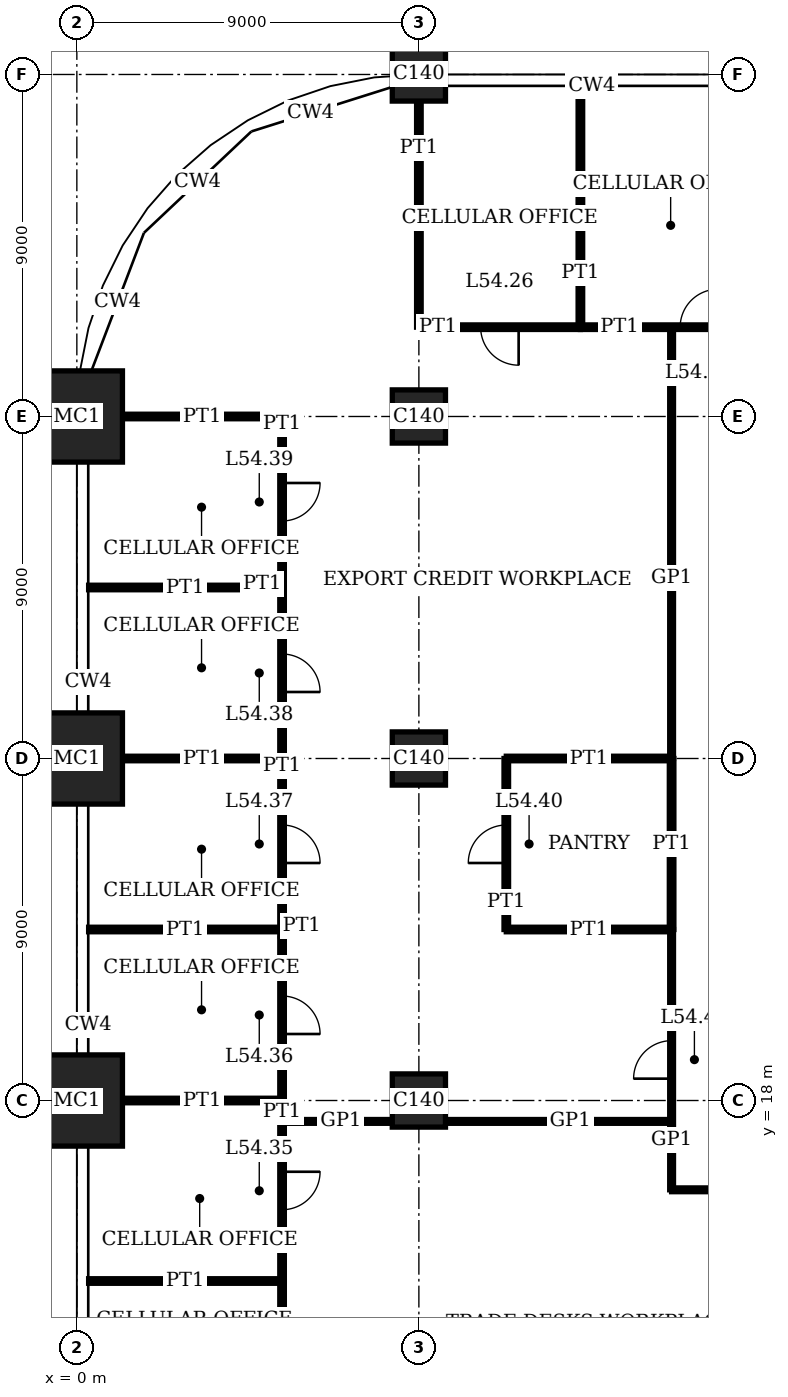
"""IFC4 building model, lengths in metres.
Left out: names, types, materials, properties, quantities, classifications, styles, units other than length and angle.
Written with IfcOpenShell. Run it as: python <this file> out.ifc"""

import sys

from ifc_helpers import new_model, si_unit, direction, frame, frame_2d, origin, origin_2d, place, context, subcontext, project, spatial, rectangle, extrude, element, fill, save


model = new_model("IFC4")
c1 = context("Model", 3, precision=1e-05, world=origin(), true_north=direction((0.0, 1.0)))
c2 = subcontext(c1, "Body", "Model", "MODEL_VIEW")
j1 = project(units=[si_unit("LENGTHUNIT", "METRE"), si_unit("PLANEANGLEUNIT", "RADIAN")], contexts=[c1])
p1 = place(None, origin())
s1 = spatial("IfcSite", under=j1, at=p1, CompositionType="ELEMENT")
p2 = place(p1, origin())
s2 = spatial("IfcBuilding", under=s1, at=p2, CompositionType="ELEMENT")
p3 = place(p2, frame((0.0, 0.0, 222.2)))
s3 = spatial("IfcBuildingStorey", under=s2, at=p3, CompositionType="ELEMENT", Elevation=222.2)
for number, where, z_axis, x_axis in (
    (1, (0.0, 18.0, 0.0), (0.0, 0.0, 1.0), (1.0, 0.0, 0.0)),
    (2, (0.0, 27.0, 0.0), (0.0, 0.0, 1.0), (1.0, 0.0, 0.0)),
    (3, (0.0, 36.0, 0.0), (0.0, 0.0, 1.0), (1.0, 0.0, 0.0)),
):
    element("IfcColumn", number, at=place(p3, frame(where, z_axis=z_axis, x_axis=x_axis)), inside=s3, PredefinedType="COLUMN", context=c2, shape_type="SweptSolid", body=[
        extrude(rectangle(XDim=2.4, YDim=2.4, at=origin_2d()), origin(), (0.0, 0.0, 1.0), 4.0),
    ])
for number, where, z_axis, x_axis in (
    (4, (9.0, 18.0, 0.0), (0.0, 0.0, 1.0), (1.0, 0.0, 0.0)),
    (5, (9.0, 27.0, 0.0), (0.0, 0.0, 1.0), (1.0, 0.0, 0.0)),
    (6, (9.0, 36.0, 0.0), (0.0, 0.0, 1.0), (1.0, 0.0, 0.0)),
    (7, (9.0, 45.0, 0.0), (0.0, 0.0, 1.0), (1.0, 0.0, 0.0)),
):
    element("IfcColumn", number, at=place(p3, frame(where, z_axis=z_axis, x_axis=x_axis)), inside=s3, PredefinedType="COLUMN", context=c2, shape_type="SweptSolid", body=[
        extrude(rectangle(XDim=1.4, YDim=1.4, at=origin_2d()), origin(), (0.0, 0.0, 1.0), 4.0),
    ])
p4 = place(p3, frame((0.31, 13.25, 0.0), z_axis=(0.0, 0.0, 1.0), x_axis=(1.0, 0.0, 0.0)))
e8 = element("IfcWall", 8, at=p4, inside=s3, PredefinedType="PARTITIONING", context=c2, shape_type="SweptSolid", body=[
    extrude(rectangle(XDim=5.09, YDim=0.12, at=frame_2d((2.545, 0.0))), origin(), (0.0, 0.0, 1.0), 3.1),
])
p5 = place(p3, frame((15.65, 15.65, 0.0), z_axis=(0.0, 0.0, 1.0), x_axis=(1.0, 0.0, 0.0)))
e9 = element("IfcWall", 9, at=p5, inside=s3, PredefinedType="PARTITIONING", context=c2, shape_type="SweptSolid", body=[
    extrude(rectangle(XDim=15.85, YDim=0.1, at=frame_2d((7.925, 0.0))), origin(), (0.0, 0.0, 1.0), 3.75),
])
p6 = place(p5, frame((7.425, 0.0, 0.0)))
e10 = element("IfcOpeningElement", 10, at=p6, cuts=e9, PredefinedType="OPENING", context=c2, shape_type="SweptSolid", body=[
    extrude(rectangle(XDim=1.0, YDim=2.4, at=frame_2d((0.5, 1.2))), frame((0.0, 0.06, 0.0), z_axis=(0.0, -1.0, 0.0), x_axis=(1.0, 0.0, 0.0)), (0.0, 0.0, 1.0), 0.12),
])
p7 = place(p3, frame((5.39, 17.45, 0.0), z_axis=(0.0, 0.0, 1.0), x_axis=(1.0, 0.0, 0.0)))
e11 = element("IfcWall", 11, at=p7, inside=s3, PredefinedType="PARTITIONING", context=c2, shape_type="SweptSolid", body=[
    extrude(rectangle(XDim=2.91, YDim=0.1, at=frame_2d((1.455, 0.0))), origin(), (0.0, 0.0, 1.0), 3.05),
])
p8 = place(p3, frame((9.7, 17.45, 0.0), z_axis=(0.0, 0.0, 1.0), x_axis=(1.0, 0.0, 0.0)))
e12 = element("IfcWall", 12, at=p8, inside=s3, PredefinedType="PARTITIONING", context=c2, shape_type="SweptSolid", body=[
    extrude(rectangle(XDim=5.95, YDim=0.1, at=frame_2d((2.975, 0.0))), origin(), (0.0, 0.0, 1.0), 3.05),
])
p9 = place(p3, frame((1.2, 18.0, 0.0), z_axis=(0.0, 0.0, 1.0), x_axis=(1.0, 0.0, 0.0)))
e13 = element("IfcWall", 13, at=p9, inside=s3, PredefinedType="PARTITIONING", context=c2, shape_type="SweptSolid", body=[
    extrude(rectangle(XDim=4.2, YDim=0.12, at=frame_2d((2.1, 0.0))), origin(), (0.0, 0.0, 1.0), 3.05),
])
p10 = place(p3, frame((0.31, 22.5, 0.0), z_axis=(0.0, 0.0, 1.0), x_axis=(1.0, 0.0, 0.0)))
e14 = element("IfcWall", 14, at=p10, inside=s3, PredefinedType="PARTITIONING", context=c2, shape_type="SweptSolid", body=[
    extrude(rectangle(XDim=5.09, YDim=0.12, at=frame_2d((2.545, 0.0))), origin(), (0.0, 0.0, 1.0), 3.1),
])
p11 = place(p3, frame((11.3, 22.5, 0.0), z_axis=(0.0, 0.0, 1.0), x_axis=(1.0, 0.0, 0.0)))
e15 = element("IfcWall", 15, at=p11, inside=s3, PredefinedType="PARTITIONING", context=c2, shape_type="SweptSolid", body=[
    extrude(rectangle(XDim=4.35, YDim=0.12, at=frame_2d((2.175, 0.0))), origin(), (0.0, 0.0, 1.0), 3.1),
])
p12 = place(p3, frame((1.2, 27.0, 0.0), z_axis=(0.0, 0.0, 1.0), x_axis=(1.0, 0.0, 0.0)))
e16 = element("IfcWall", 16, at=p12, inside=s3, PredefinedType="PARTITIONING", context=c2, shape_type="SweptSolid", body=[
    extrude(rectangle(XDim=4.2, YDim=0.12, at=frame_2d((2.1, 0.0))), origin(), (0.0, 0.0, 1.0), 3.05),
])
p13 = place(p3, frame((11.3, 27.0, 0.0), z_axis=(0.0, 0.0, 1.0), x_axis=(1.0, 0.0, 0.0)))
e17 = element("IfcWall", 17, at=p13, inside=s3, PredefinedType="PARTITIONING", context=c2, shape_type="SweptSolid", body=[
    extrude(rectangle(XDim=4.35, YDim=0.12, at=frame_2d((2.175, 0.0))), origin(), (0.0, 0.0, 1.0), 3.05),
])
p14 = place(p3, frame((0.31, 31.5, 0.0), z_axis=(0.0, 0.0, 1.0), x_axis=(1.0, 0.0, 0.0)))
e18 = element("IfcWall", 18, at=p14, inside=s3, PredefinedType="PARTITIONING", context=c2, shape_type="SweptSolid", body=[
    extrude(rectangle(XDim=5.09, YDim=0.12, at=frame_2d((2.545, 0.0))), origin(), (0.0, 0.0, 1.0), 3.1),
])
p15 = place(p3, frame((1.2, 36.0, 0.0), z_axis=(0.0, 0.0, 1.0), x_axis=(1.0, 0.0, 0.0)))
e19 = element("IfcWall", 19, at=p15, inside=s3, PredefinedType="PARTITIONING", context=c2, shape_type="SweptSolid", body=[
    extrude(rectangle(XDim=4.2, YDim=0.12, at=frame_2d((2.1, 0.0))), origin(), (0.0, 0.0, 1.0), 3.05),
])
p16 = place(p3, frame((9.0, 38.35, 0.0), z_axis=(0.0, 0.0, 1.0), x_axis=(1.0, 0.0, 0.0)))
e20 = element("IfcWall", 20, at=p16, inside=s3, PredefinedType="PARTITIONING", context=c2, shape_type="SweptSolid", body=[
    extrude(rectangle(XDim=4.25, YDim=0.12, at=frame_2d((2.125, 0.0))), origin(), (0.0, 0.0, 1.0), 3.75),
])
p17 = place(p16, frame((1.625, 0.0, 0.0)))
e21 = element("IfcOpeningElement", 21, at=p17, cuts=e20, PredefinedType="OPENING", context=c2, shape_type="SweptSolid", body=[
    extrude(rectangle(XDim=1.0, YDim=2.4, at=frame_2d((0.5, 1.2))), frame((0.0, 0.07, 0.0), z_axis=(0.0, -1.0, 0.0), x_axis=(1.0, 0.0, 0.0)), (0.0, 0.0, 1.0), 0.14),
])
p18 = place(p3, frame((13.25, 38.35, 0.0), z_axis=(0.0, 0.0, 1.0), x_axis=(1.0, 0.0, 0.0)))
e22 = element("IfcWall", 22, at=p18, inside=s3, PredefinedType="PARTITIONING", context=c2, shape_type="SweptSolid", body=[
    extrude(rectangle(XDim=4.75, YDim=0.12, at=frame_2d((2.375, 0.0))), origin(), (0.0, 0.0, 1.0), 3.75),
])
p19 = place(p18, frame((2.625, 0.0, 0.0)))
e23 = element("IfcOpeningElement", 23, at=p19, cuts=e22, PredefinedType="OPENING", context=c2, shape_type="SweptSolid", body=[
    extrude(rectangle(XDim=1.0, YDim=2.4, at=frame_2d((0.5, 1.2))), frame((0.0, 0.07, 0.0), z_axis=(0.0, -1.0, 0.0), x_axis=(1.0, 0.0, 0.0)), (0.0, 0.0, 1.0), 0.14),
])
p20 = place(p3, frame((5.4, 9.0, 0.0), z_axis=(0.0, 0.0, 1.0), x_axis=(0.0, 1.0, 0.0)))
e24 = element("IfcWall", 24, at=p20, inside=s3, PredefinedType="PARTITIONING", context=c2, shape_type="SweptSolid", body=[
    extrude(rectangle(XDim=4.25, YDim=0.12, at=frame_2d((2.125, 0.0))), origin(), (0.0, 0.0, 1.0), 3.75),
])
p21 = place(p20, frame((1.625, 0.0, 0.0)))
e25 = element("IfcOpeningElement", 25, at=p21, cuts=e24, PredefinedType="OPENING", context=c2, shape_type="SweptSolid", body=[
    extrude(rectangle(XDim=1.0, YDim=2.4, at=frame_2d((0.5, 1.2))), frame((0.0, 0.07, 0.0), z_axis=(0.0, -1.0, 0.0), x_axis=(1.0, 0.0, 0.0)), (0.0, 0.0, 1.0), 0.14),
])
p22 = place(p3, frame((5.4, 13.25, 0.0), z_axis=(0.0, 0.0, 1.0), x_axis=(0.0, 1.0, 0.0)))
e26 = element("IfcWall", 26, at=p22, inside=s3, PredefinedType="PARTITIONING", context=c2, shape_type="SweptSolid", body=[
    extrude(rectangle(XDim=4.75, YDim=0.12, at=frame_2d((2.375, 0.0))), origin(), (0.0, 0.0, 1.0), 3.75),
])
p23 = place(p22, frame((1.875, 0.0, 0.0)))
e27 = element("IfcOpeningElement", 27, at=p23, cuts=e26, PredefinedType="OPENING", context=c2, shape_type="SweptSolid", body=[
    extrude(rectangle(XDim=1.0, YDim=2.4, at=frame_2d((0.5, 1.2))), frame((0.0, 0.07, 0.0), z_axis=(0.0, -1.0, 0.0), x_axis=(1.0, 0.0, 0.0)), (0.0, 0.0, 1.0), 0.14),
])
p24 = place(p3, frame((5.4, 18.0, 0.0), z_axis=(0.0, 0.0, 1.0), x_axis=(0.0, 1.0, 0.0)))
e28 = element("IfcWall", 28, at=p24, inside=s3, PredefinedType="PARTITIONING", context=c2, shape_type="SweptSolid", body=[
    extrude(rectangle(XDim=4.5, YDim=0.12, at=frame_2d((2.25, 0.0))), origin(), (0.0, 0.0, 1.0), 3.75),
])
p25 = place(p24, frame((1.75, 0.0, 0.0)))
e29 = element("IfcOpeningElement", 29, at=p25, cuts=e28, PredefinedType="OPENING", context=c2, shape_type="SweptSolid", body=[
    extrude(rectangle(XDim=1.0, YDim=2.4, at=frame_2d((0.5, 1.2))), frame((0.0, 0.07, 0.0), z_axis=(0.0, -1.0, 0.0), x_axis=(1.0, 0.0, 0.0)), (0.0, 0.0, 1.0), 0.14),
])
p26 = place(p3, frame((5.4, 22.5, 0.0), z_axis=(0.0, 0.0, 1.0), x_axis=(0.0, 1.0, 0.0)))
e30 = element("IfcWall", 30, at=p26, inside=s3, PredefinedType="PARTITIONING", context=c2, shape_type="SweptSolid", body=[
    extrude(rectangle(XDim=4.5, YDim=0.12, at=frame_2d((2.25, 0.0))), origin(), (0.0, 0.0, 1.0), 3.75),
])
p27 = place(p26, frame((1.75, 0.0, 0.0)))
e31 = element("IfcOpeningElement", 31, at=p27, cuts=e30, PredefinedType="OPENING", context=c2, shape_type="SweptSolid", body=[
    extrude(rectangle(XDim=1.0, YDim=2.4, at=frame_2d((0.5, 1.2))), frame((0.0, 0.07, 0.0), z_axis=(0.0, -1.0, 0.0), x_axis=(1.0, 0.0, 0.0)), (0.0, 0.0, 1.0), 0.14),
])
p28 = place(p3, frame((5.4, 27.0, 0.0), z_axis=(0.0, 0.0, 1.0), x_axis=(0.0, 1.0, 0.0)))
e32 = element("IfcWall", 32, at=p28, inside=s3, PredefinedType="PARTITIONING", context=c2, shape_type="SweptSolid", body=[
    extrude(rectangle(XDim=4.5, YDim=0.12, at=frame_2d((2.25, 0.0))), origin(), (0.0, 0.0, 1.0), 3.75),
])
p29 = place(p28, frame((1.75, 0.0, 0.0)))
e33 = element("IfcOpeningElement", 33, at=p29, cuts=e32, PredefinedType="OPENING", context=c2, shape_type="SweptSolid", body=[
    extrude(rectangle(XDim=1.0, YDim=2.4, at=frame_2d((0.5, 1.2))), frame((0.0, 0.07, 0.0), z_axis=(0.0, -1.0, 0.0), x_axis=(1.0, 0.0, 0.0)), (0.0, 0.0, 1.0), 0.14),
])
p30 = place(p3, frame((5.4, 31.5, 0.0), z_axis=(0.0, 0.0, 1.0), x_axis=(0.0, 1.0, 0.0)))
e34 = element("IfcWall", 34, at=p30, inside=s3, PredefinedType="PARTITIONING", context=c2, shape_type="SweptSolid", body=[
    extrude(rectangle(XDim=4.5, YDim=0.12, at=frame_2d((2.25, 0.0))), origin(), (0.0, 0.0, 1.0), 3.75),
])
p31 = place(p30, frame((1.75, 0.0, 0.0)))
e35 = element("IfcOpeningElement", 35, at=p31, cuts=e34, PredefinedType="OPENING", context=c2, shape_type="SweptSolid", body=[
    extrude(rectangle(XDim=1.0, YDim=2.4, at=frame_2d((0.5, 1.2))), frame((0.0, 0.07, 0.0), z_axis=(0.0, -1.0, 0.0), x_axis=(1.0, 0.0, 0.0)), (0.0, 0.0, 1.0), 0.14),
])
p32 = place(p3, frame((9.0, 38.35, 0.0), z_axis=(0.0, 0.0, 1.0), x_axis=(0.0, 1.0, 0.0)))
e36 = element("IfcWall", 36, at=p32, inside=s3, PredefinedType="PARTITIONING", context=c2, shape_type="SweptSolid", body=[
    extrude(rectangle(XDim=5.95, YDim=0.12, at=frame_2d((2.975, 0.0))), origin(), (0.0, 0.0, 1.0), 3.05),
])
p33 = place(p3, frame((11.3, 22.5, 0.0), z_axis=(0.0, 0.0, 1.0), x_axis=(0.0, 1.0, 0.0)))
e37 = element("IfcWall", 37, at=p33, inside=s3, PredefinedType="PARTITIONING", context=c2, shape_type="SweptSolid", body=[
    extrude(rectangle(XDim=4.5, YDim=0.12, at=frame_2d((2.25, 0.0))), origin(), (0.0, 0.0, 1.0), 3.75),
])
p34 = place(p33, frame((1.75, 0.0, 0.0)))
e38 = element("IfcOpeningElement", 38, at=p34, cuts=e37, PredefinedType="OPENING", context=c2, shape_type="SweptSolid", body=[
    extrude(rectangle(XDim=1.0, YDim=2.4, at=frame_2d((0.5, 1.2))), frame((0.0, 0.07, 0.0), z_axis=(0.0, -1.0, 0.0), x_axis=(1.0, 0.0, 0.0)), (0.0, 0.0, 1.0), 0.14),
])
p35 = place(p3, frame((13.25, 38.35, 0.0), z_axis=(0.0, 0.0, 1.0), x_axis=(0.0, 1.0, 0.0)))
e39 = element("IfcWall", 39, at=p35, inside=s3, PredefinedType="PARTITIONING", context=c2, shape_type="SweptSolid", body=[
    extrude(rectangle(XDim=6.34, YDim=0.12, at=frame_2d((3.17, 0.0))), origin(), (0.0, 0.0, 1.0), 3.75),
])
p36 = place(p3, frame((15.65, 22.5, 0.0), z_axis=(0.0, 0.0, 1.0), x_axis=(0.0, 1.0, 0.0)))
e40 = element("IfcWall", 40, at=p36, inside=s3, PredefinedType="PARTITIONING", context=c2, shape_type="SweptSolid", body=[
    extrude(rectangle(XDim=4.5, YDim=0.12, at=frame_2d((2.25, 0.0))), origin(), (0.0, 0.0, 1.0), 3.75),
])
p37 = place(p3, frame((15.65, 15.65, 0.0), z_axis=(0.0, 0.0, 1.0), x_axis=(0.0, 1.0, 0.0)))
e41 = element("IfcWall", 41, at=p37, inside=s3, PredefinedType="PARTITIONING", context=c2, shape_type="SweptSolid", body=[
    extrude(rectangle(XDim=6.85, YDim=0.1, at=frame_2d((3.425, 0.0))), origin(), (0.0, 0.0, 1.0), 3.75),
])
p38 = place(p37, frame((2.925, 0.0, 0.0)))
e42 = element("IfcOpeningElement", 42, at=p38, cuts=e41, PredefinedType="OPENING", context=c2, shape_type="SweptSolid", body=[
    extrude(rectangle(XDim=1.0, YDim=2.4, at=frame_2d((0.5, 1.2))), frame((0.0, 0.06, 0.0), z_axis=(0.0, -1.0, 0.0), x_axis=(1.0, 0.0, 0.0)), (0.0, 0.0, 1.0), 0.12),
])
p39 = place(p3, frame((15.65, 27.0, 0.0), z_axis=(0.0, 0.0, 1.0), x_axis=(0.0, 1.0, 0.0)))
e43 = element("IfcWall", 43, at=p39, inside=s3, PredefinedType="PARTITIONING", context=c2, shape_type="SweptSolid", body=[
    extrude(rectangle(XDim=11.35, YDim=0.1, at=frame_2d((5.675, 0.0))), origin(), (0.0, 0.0, 1.0), 3.75),
])
p40 = place(p17, origin())
e44 = element("IfcDoor", 44, at=p40, inside=s3, OperationType="SINGLE_SWING_RIGHT", PredefinedType="DOOR", context=c2, shape_type="SweptSolid", body=[
    extrude(rectangle(XDim=1.0, YDim=2.4, at=frame_2d((0.5, 1.2))), frame((0.0, 0.025, 0.0), z_axis=(0.0, -1.0, 0.0), x_axis=(1.0, 0.0, 0.0)), (0.0, 0.0, 1.0), 0.05),
])
fill(e21, e44)
p41 = place(p19, origin())
e45 = element("IfcDoor", 45, at=p41, inside=s3, OperationType="SINGLE_SWING_LEFT", PredefinedType="DOOR", context=c2, shape_type="SweptSolid", body=[
    extrude(rectangle(XDim=1.0, YDim=2.4, at=frame_2d((0.5, 1.2))), frame((0.0, 0.025, 0.0), z_axis=(0.0, -1.0, 0.0), x_axis=(1.0, 0.0, 0.0)), (0.0, 0.0, 1.0), 0.05),
])
fill(e23, e45)
p42 = place(p23, origin())
e46 = element("IfcDoor", 46, at=p42, inside=s3, OperationType="SINGLE_SWING_RIGHT", PredefinedType="DOOR", context=c2, shape_type="SweptSolid", body=[
    extrude(rectangle(XDim=1.0, YDim=2.4, at=frame_2d((0.5, 1.2))), frame((0.0, 0.025, 0.0), z_axis=(0.0, -1.0, 0.0), x_axis=(1.0, 0.0, 0.0)), (0.0, 0.0, 1.0), 0.05),
])
fill(e27, e46)
p43 = place(p25, origin())
e47 = element("IfcDoor", 47, at=p43, inside=s3, OperationType="SINGLE_SWING_LEFT", PredefinedType="DOOR", context=c2, shape_type="SweptSolid", body=[
    extrude(rectangle(XDim=1.0, YDim=2.4, at=frame_2d((0.5, 1.2))), frame((0.0, 0.025, 0.0), z_axis=(0.0, -1.0, 0.0), x_axis=(1.0, 0.0, 0.0)), (0.0, 0.0, 1.0), 0.05),
])
fill(e29, e47)
p44 = place(p27, origin())
e48 = element("IfcDoor", 48, at=p44, inside=s3, OperationType="SINGLE_SWING_LEFT", PredefinedType="DOOR", context=c2, shape_type="SweptSolid", body=[
    extrude(rectangle(XDim=1.0, YDim=2.4, at=frame_2d((0.5, 1.2))), frame((0.0, 0.025, 0.0), z_axis=(0.0, -1.0, 0.0), x_axis=(1.0, 0.0, 0.0)), (0.0, 0.0, 1.0), 0.05),
])
fill(e31, e48)
p45 = place(p29, origin())
e49 = element("IfcDoor", 49, at=p45, inside=s3, OperationType="SINGLE_SWING_LEFT", PredefinedType="DOOR", context=c2, shape_type="SweptSolid", body=[
    extrude(rectangle(XDim=1.0, YDim=2.4, at=frame_2d((0.5, 1.2))), frame((0.0, 0.025, 0.0), z_axis=(0.0, -1.0, 0.0), x_axis=(1.0, 0.0, 0.0)), (0.0, 0.0, 1.0), 0.05),
])
fill(e33, e49)
p46 = place(p31, origin())
e50 = element("IfcDoor", 50, at=p46, inside=s3, OperationType="SINGLE_SWING_RIGHT", PredefinedType="DOOR", context=c2, shape_type="SweptSolid", body=[
    extrude(rectangle(XDim=1.0, YDim=2.4, at=frame_2d((0.5, 1.2))), frame((0.0, 0.025, 0.0), z_axis=(0.0, -1.0, 0.0), x_axis=(1.0, 0.0, 0.0)), (0.0, 0.0, 1.0), 0.05),
])
fill(e35, e50)
p47 = place(p34, origin())
e51 = element("IfcDoor", 51, at=p47, inside=s3, OperationType="SINGLE_SWING_RIGHT", PredefinedType="DOOR", context=c2, shape_type="SweptSolid", body=[
    extrude(rectangle(XDim=1.0, YDim=2.4, at=frame_2d((0.5, 1.2))), frame((0.0, 0.025, 0.0), z_axis=(0.0, -1.0, 0.0), x_axis=(1.0, 0.0, 0.0)), (0.0, 0.0, 1.0), 0.05),
])
fill(e38, e51)
p48 = place(p38, origin())
e52 = element("IfcDoor", 52, at=p48, inside=s3, OperationType="SINGLE_SWING_RIGHT", PredefinedType="DOOR", context=c2, shape_type="SweptSolid", body=[
    extrude(rectangle(XDim=1.0, YDim=2.4, at=frame_2d((0.5, 1.2))), frame((0.0, 0.02, 0.0), z_axis=(0.0, -1.0, 0.0), x_axis=(1.0, 0.0, 0.0)), (0.0, 0.0, 1.0), 0.04),
])
fill(e42, e52)
save(model, sys.argv[1])
